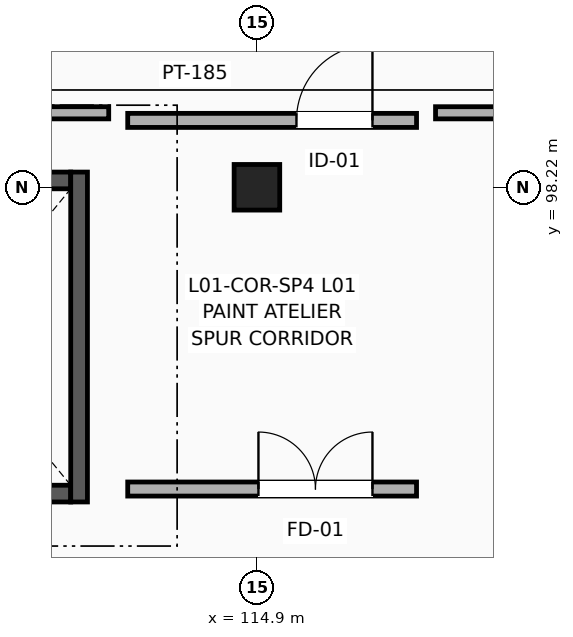
"""IFC4 building model, lengths in metres.
Left out: names, types, materials, properties, quantities, classifications, styles, units other than length and angle.
Written with IfcOpenShell. Run it as: python <this file> out.ifc"""

import sys

from ifc_helpers import new_model, si_unit, direction, frame, frame_2d, origin, origin_2d, place, context, subcontext, project, spatial, rectangle, extrude, element, fill, save


model = new_model("IFC4")
c1 = context("Model", 3, precision=1e-05, world=origin(), true_north=direction((0.0, 1.0)))
c2 = subcontext(c1, "Body", "Model", "MODEL_VIEW")
j1 = project(units=[si_unit("LENGTHUNIT", "METRE"), si_unit("PLANEANGLEUNIT", "RADIAN")], contexts=[c1])
p1 = place(None, origin())
s1 = spatial("IfcSite", under=j1, at=p1, CompositionType="ELEMENT")
p2 = place(p1, origin())
s2 = spatial("IfcBuilding", under=s1, at=p2, CompositionType="ELEMENT")
p3 = place(p2, frame((0.0, 0.0, 5.4)))
s3 = spatial("IfcBuildingStorey", under=s2, at=p3, CompositionType="ELEMENT", Elevation=5.4)
p4 = place(p3, frame((114.9, 98.22, 0.0), z_axis=(0.0, 0.0, 1.0), x_axis=(1.0, 0.0, 0.0)))
e1 = element("IfcColumn", 1, at=p4, inside=s3, PredefinedType="COLUMN", context=c2, shape_type="SweptSolid", body=[
    extrude(rectangle(XDim=0.6, YDim=0.6, at=origin_2d()), origin(), (0.0, 0.0, 1.0), 4.8),
])
p5 = place(p3, frame((109.25, 94.19, 0.0), z_axis=(0.0, 0.0, 1.0), x_axis=(1.0, 0.0, 0.0)))
e2 = element("IfcWall", 2, at=p5, inside=s3, PredefinedType="SOLIDWALL", context=c2, shape_type="SweptSolid", body=[
    extrude(rectangle(XDim=3.2, YDim=0.22, at=frame_2d((1.6, 0.0))), origin(), (0.0, 0.0, 1.0), 4.525),
])
p6 = place(p5, frame((0.5, 0.0, 0.0)))
e3 = element("IfcOpeningElement", 3, at=p6, cuts=e2, PredefinedType="OPENING", context=c2, shape_type="SweptSolid", body=[
    extrude(rectangle(XDim=2.2, YDim=2.6, at=frame_2d((1.1, 1.3))), frame((0.0, 0.12, 0.0), z_axis=(0.0, -1.0, 0.0), x_axis=(1.0, 0.0, 0.0)), (0.0, 0.0, 1.0), 0.24),
])
p7 = place(p3, frame((109.25, 98.31, 0.0), z_axis=(0.0, 0.0, 1.0), x_axis=(1.0, 0.0, 0.0)))
e4 = element("IfcWall", 4, at=p7, inside=s3, PredefinedType="SOLIDWALL", context=c2, shape_type="SweptSolid", body=[
    extrude(rectangle(XDim=3.2, YDim=0.22, at=frame_2d((1.6, 0.0))), origin(), (0.0, 0.0, 1.0), 3.687),
])
p8 = place(p3, frame((112.56, 94.08, 0.0), z_axis=(0.0, 0.0, 1.0), x_axis=(0.0, 1.0, 0.0)))
e5 = element("IfcWall", 5, at=p8, inside=s3, PredefinedType="SOLIDWALL", context=c2, shape_type="SweptSolid", body=[
    extrude(rectangle(XDim=4.34, YDim=0.22, at=frame_2d((2.17, 0.0))), origin(), (0.0, 0.0, 1.0), 3.687),
])
p9 = place(p3, frame((113.2, 94.25, 0.0), z_axis=(0.0, 0.0, 1.0), x_axis=(1.0, 0.0, 0.0)))
e6 = element("IfcWall", 6, at=p9, inside=s3, PredefinedType="PARTITIONING", context=c2, shape_type="SweptSolid", body=[
    extrude(rectangle(XDim=3.8, YDim=0.185, at=frame_2d((1.9, 0.0))), origin(), (0.0, 0.0, 1.0), 4.177),
])
p10 = place(p9, frame((1.72, 0.0, 0.0)))
e7 = element("IfcOpeningElement", 7, at=p10, cuts=e6, PredefinedType="OPENING", context=c2, shape_type="SweptSolid", body=[
    extrude(rectangle(XDim=1.5, YDim=2.2, at=frame_2d((0.75, 1.1))), frame((0.0, 0.103, 0.0), z_axis=(0.0, -1.0, 0.0), x_axis=(1.0, 0.0, 0.0)), (0.0, 0.0, 1.0), 0.205),
])
p11 = place(p3, frame((113.2, 99.1, 0.0), z_axis=(0.0, 0.0, 1.0), x_axis=(1.0, 0.0, 0.0)))
e8 = element("IfcWall", 8, at=p11, inside=s3, PredefinedType="PARTITIONING", context=c2, shape_type="SweptSolid", body=[
    extrude(rectangle(XDim=3.8, YDim=0.185, at=frame_2d((1.9, 0.0))), origin(), (0.0, 0.0, 1.0), 3.837),
])
p12 = place(p11, frame((2.22, 0.0, 0.0)))
e9 = element("IfcOpeningElement", 9, at=p12, cuts=e8, PredefinedType="OPENING", context=c2, shape_type="SweptSolid", body=[
    extrude(rectangle(XDim=1.0, YDim=2.2, at=frame_2d((0.5, 1.1))), frame((0.0, 0.103, 0.0), z_axis=(0.0, -1.0, 0.0), x_axis=(1.0, 0.0, 0.0)), (0.0, 0.0, 1.0), 0.205),
])
p13 = place(p3, frame((99.1, 99.2, 0.0), z_axis=(0.0, 0.0, 1.0), x_axis=(1.0, 0.0, 0.0)))
e10 = element("IfcWall", 10, at=p13, inside=s3, PredefinedType="PARTITIONING", context=c2, shape_type="SweptSolid", body=[
    extrude(rectangle(XDim=13.85, YDim=0.16, at=frame_2d((6.925, 0.0))), origin(), (0.0, 0.0, 1.0), 3.837),
])
p14 = place(p3, frame((117.25, 99.2, 0.0), z_axis=(0.0, 0.0, 1.0), x_axis=(1.0, 0.0, 0.0)))
e11 = element("IfcWall", 11, at=p14, inside=s3, PredefinedType="PARTITIONING", context=c2, shape_type="SweptSolid", body=[
    extrude(rectangle(XDim=13.45, YDim=0.16, at=frame_2d((6.725, 0.0))), origin(), (0.0, 0.0, 1.0), 3.837),
])
p15 = place(p10, origin())
e12 = element("IfcDoor", 12, at=p15, inside=s3, OperationType="DOUBLE_DOOR_SINGLE_SWING", PredefinedType="DOOR", context=c2, shape_type="SweptSolid", body=[
    extrude(rectangle(XDim=1.5, YDim=2.2, at=frame_2d((0.75, 1.1))), frame((0.0, 0.025, 0.0), z_axis=(0.0, -1.0, 0.0), x_axis=(1.0, 0.0, 0.0)), (0.0, 0.0, 1.0), 0.05),
])
fill(e7, e12)
p16 = place(p12, origin())
e13 = element("IfcDoor", 13, at=p16, inside=s3, OperationType="SINGLE_SWING_RIGHT", PredefinedType="DOOR", context=c2, shape_type="SweptSolid", body=[
    extrude(rectangle(XDim=1.0, YDim=2.2, at=frame_2d((0.5, 1.1))), frame((0.0, 0.025, 0.0), z_axis=(0.0, -1.0, 0.0), x_axis=(1.0, 0.0, 0.0)), (0.0, 0.0, 1.0), 0.05),
])
fill(e9, e13)
save(model, sys.argv[1])
